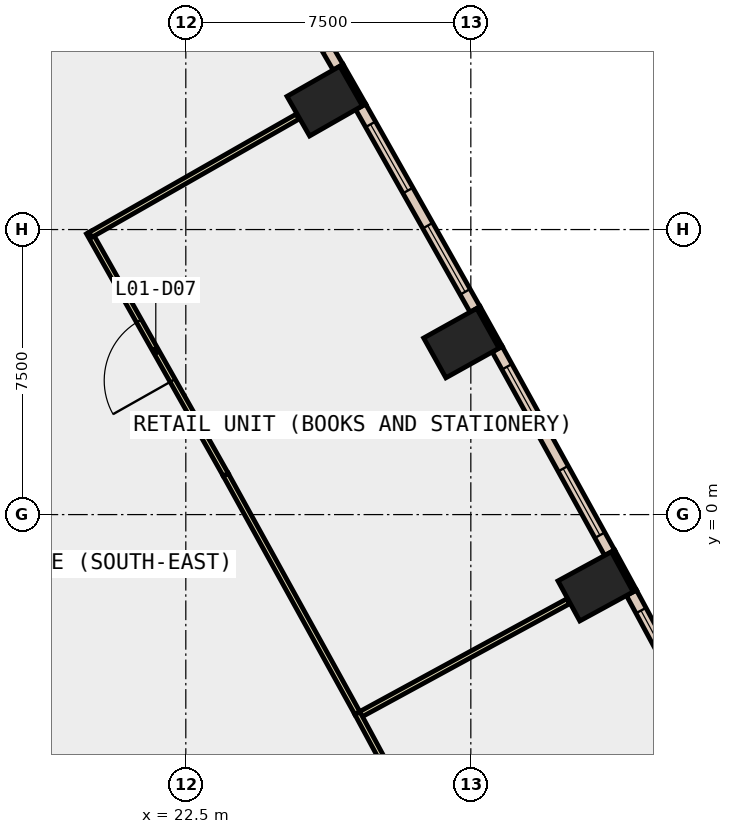
"""IFC4 building model, lengths in metres.
Left out: names, types, materials, properties, quantities, classifications, styles, units other than length and angle.
Written with IfcOpenShell. Run it as: python <this file> out.ifc"""

import sys

from ifc_helpers import new_model, si_unit, direction, frame, frame_2d, origin, origin_2d, place, context, subcontext, project, spatial, rectangle, extrude, element, fill, save


model = new_model("IFC4")
c1 = context("Model", 3, precision=1e-05, world=origin(), true_north=direction((0.0, 1.0)))
c2 = subcontext(c1, "Body", "Model", "MODEL_VIEW")
j1 = project(units=[si_unit("LENGTHUNIT", "METRE"), si_unit("PLANEANGLEUNIT", "RADIAN")], contexts=[c1])
p1 = place(None, origin())
s1 = spatial("IfcSite", under=j1, at=p1, CompositionType="ELEMENT")
p2 = place(p1, origin())
s2 = spatial("IfcBuilding", under=s1, at=p2, CompositionType="ELEMENT")
p3 = place(p2, frame((0.0, 0.0, 9.0)))
s3 = spatial("IfcBuildingStorey", under=s2, at=p3, CompositionType="ELEMENT", Elevation=9.0)
for number, where, z_axis, x_axis in (
    (1, (33.283, -1.889, -0.45), (0.0, 0.0, 1.0), (-0.478, 0.878, 0.0)),
    (2, (29.75, 4.512, -0.45), (0.0, 0.0, 1.0), (-0.487, 0.873, 0.0)),
    (3, (26.155, 10.88, -0.45), (0.0, 0.0, 1.0), (-0.496, 0.869, 0.0)),
):
    element("IfcColumn", number, at=place(p3, frame(where, z_axis=z_axis, x_axis=x_axis)), inside=s3, PredefinedType="COLUMN", context=c2, shape_type="SweptSolid", body=[
        extrude(rectangle(XDim=1.2, YDim=1.6, at=origin_2d()), origin(), (0.0, 0.0, 1.0), 6.0),
    ])
p4 = place(p3, frame((34.316, -2.01, 0.0), z_axis=(0.0, 0.0, 1.0), x_axis=(-0.478267644701, 0.878214131082, 0.0)))
e4 = element("IfcWall", 4, at=p4, inside=s3, PredefinedType="STANDARD", context=c2, shape_type="SweptSolid", body=[
    extrude(rectangle(XDim=1.2, YDim=0.1, at=frame_2d((0.6, 0.0))), origin(), (0.0, 0.0, 1.0), 5.55),
])
p5 = place(p3, frame((30.784, 4.402, 0.0), z_axis=(0.0, 0.0, 1.0), x_axis=(-0.486817526853, 0.873503689488, 0.0)))
e5 = element("IfcWall", 5, at=p5, inside=s3, PredefinedType="STANDARD", context=c2, shape_type="SweptSolid", body=[
    extrude(rectangle(XDim=1.2, YDim=0.1, at=frame_2d((0.6, 0.0))), origin(), (0.0, 0.0, 1.0), 5.55),
])
p6 = place(p3, frame((27.191, 10.78, 0.0), z_axis=(0.0, 0.0, 1.0), x_axis=(-0.495854054996, 0.868405870629, 0.0)))
e6 = element("IfcWall", 6, at=p6, inside=s3, PredefinedType="STANDARD", context=c2, shape_type="SweptSolid", body=[
    extrude(rectangle(XDim=1.2, YDim=0.1, at=frame_2d((0.6, 0.0))), origin(), (0.0, 0.0, 1.0), 5.55),
])
p7 = place(p3, frame((37.131, -7.446, 0.0), z_axis=(0.0, 0.0, 1.0), x_axis=(-0.474584950749, 0.880209704856, 0.0)))
e7 = element("IfcWall", 7, at=p7, inside=s3, PredefinedType="STANDARD", context=c2, shape_type="SweptSolid", body=[
    extrude(rectangle(XDim=6.121, YDim=0.3, at=frame_2d((3.061, 0.0))), origin(), (0.0, 0.0, 1.0), 5.55),
])
p8 = place(p7, frame((0.53, 0.0, 1.0)))
e8 = element("IfcOpeningElement", 8, at=p8, cuts=e7, PredefinedType="OPENING", context=c2, shape_type="SweptSolid", body=[
    extrude(rectangle(XDim=2.0, YDim=4.0, at=frame_2d((1.0, 2.0))), frame((0.0, 0.16, 0.0), z_axis=(0.0, -1.0, 0.0), x_axis=(1.0, 0.0, 0.0)), (0.0, 0.0, 1.0), 0.32),
])
p9 = place(p7, frame((3.591, 0.0, 1.0)))
e9 = element("IfcOpeningElement", 9, at=p9, cuts=e7, PredefinedType="OPENING", context=c2, shape_type="SweptSolid", body=[
    extrude(rectangle(XDim=2.0, YDim=4.0, at=frame_2d((1.0, 2.0))), frame((0.0, 0.16, 0.0), z_axis=(0.0, -1.0, 0.0), x_axis=(1.0, 0.0, 0.0)), (0.0, 0.0, 1.0), 0.32),
])
p10 = place(p3, frame((33.652, -1.006, 0.0), z_axis=(0.0, 0.0, 1.0), x_axis=(-0.483233380559, 0.875491576152, 0.0)))
e10 = element("IfcWall", 10, at=p10, inside=s3, PredefinedType="STANDARD", context=c2, shape_type="SweptSolid", body=[
    extrude(rectangle(XDim=6.121, YDim=0.3, at=frame_2d((3.061, 0.0))), origin(), (0.0, 0.0, 1.0), 5.55),
])
p11 = place(p10, frame((0.53, 0.0, 1.0)))
e11 = element("IfcOpeningElement", 11, at=p11, cuts=e10, PredefinedType="OPENING", context=c2, shape_type="SweptSolid", body=[
    extrude(rectangle(XDim=2.0, YDim=4.0, at=frame_2d((1.0, 2.0))), frame((0.0, 0.16, 0.0), z_axis=(0.0, -1.0, 0.0), x_axis=(1.0, 0.0, 0.0)), (0.0, 0.0, 1.0), 0.32),
])
p12 = place(p10, frame((3.591, 0.0, 1.0)))
e12 = element("IfcOpeningElement", 12, at=p12, cuts=e10, PredefinedType="OPENING", context=c2, shape_type="SweptSolid", body=[
    extrude(rectangle(XDim=2.0, YDim=4.0, at=frame_2d((1.0, 2.0))), frame((0.0, 0.16, 0.0), z_axis=(0.0, -1.0, 0.0), x_axis=(1.0, 0.0, 0.0)), (0.0, 0.0, 1.0), 0.32),
])
p13 = place(p3, frame((30.111, 5.399, 0.0), z_axis=(0.0, 0.0, 1.0), x_axis=(-0.491661677717, 0.870786308267, 0.0)))
e13 = element("IfcWall", 13, at=p13, inside=s3, PredefinedType="STANDARD", context=c2, shape_type="SweptSolid", body=[
    extrude(rectangle(XDim=6.122, YDim=0.3, at=frame_2d((3.061, 0.0))), origin(), (0.0, 0.0, 1.0), 5.55),
])
p14 = place(p13, frame((0.531, 0.0, 1.0)))
e14 = element("IfcOpeningElement", 14, at=p14, cuts=e13, PredefinedType="OPENING", context=c2, shape_type="SweptSolid", body=[
    extrude(rectangle(XDim=2.0, YDim=4.0, at=frame_2d((1.0, 2.0))), frame((0.0, 0.16, 0.0), z_axis=(0.0, -1.0, 0.0), x_axis=(1.0, 0.0, 0.0)), (0.0, 0.0, 1.0), 0.32),
])
p15 = place(p13, frame((3.592, 0.0, 1.0)))
e15 = element("IfcOpeningElement", 15, at=p15, cuts=e13, PredefinedType="OPENING", context=c2, shape_type="SweptSolid", body=[
    extrude(rectangle(XDim=2.0, YDim=4.0, at=frame_2d((1.0, 2.0))), frame((0.0, 0.16, 0.0), z_axis=(0.0, -1.0, 0.0), x_axis=(1.0, 0.0, 0.0)), (0.0, 0.0, 1.0), 0.32),
])
p16 = place(p3, frame((26.507, 11.77, 0.0), z_axis=(0.0, 0.0, 1.0), x_axis=(-0.499939977436, 0.866060055055, 0.0)))
e16 = element("IfcWall", 16, at=p16, inside=s3, PredefinedType="STANDARD", context=c2, shape_type="SweptSolid", body=[
    extrude(rectangle(XDim=6.121, YDim=0.3, at=frame_2d((3.061, 0.0))), origin(), (0.0, 0.0, 1.0), 5.55),
])
p17 = place(p16, frame((0.53, 0.0, 1.0)))
e17 = element("IfcOpeningElement", 17, at=p17, cuts=e16, PredefinedType="OPENING", context=c2, shape_type="SweptSolid", body=[
    extrude(rectangle(XDim=2.0, YDim=4.0, at=frame_2d((1.0, 2.0))), frame((0.0, 0.16, 0.0), z_axis=(0.0, -1.0, 0.0), x_axis=(1.0, 0.0, 0.0)), (0.0, 0.0, 1.0), 0.32),
])
p18 = place(p16, frame((3.591, 0.0, 1.0)))
e18 = element("IfcOpeningElement", 18, at=p18, cuts=e16, PredefinedType="OPENING", context=c2, shape_type="SweptSolid", body=[
    extrude(rectangle(XDim=2.0, YDim=4.0, at=frame_2d((1.0, 2.0))), frame((0.0, 0.16, 0.0), z_axis=(0.0, -1.0, 0.0), x_axis=(1.0, 0.0, 0.0)), (0.0, 0.0, 1.0), 0.32),
])
p19 = place(p3, frame((27.047, -5.284, 0.0), z_axis=(0.0, 0.0, 1.0), x_axis=(0.878278583626, 0.478149275377, 0.0)))
e19 = element("IfcWall", 19, at=p19, inside=s3, PredefinedType="PARTITIONING", context=c2, shape_type="SweptSolid", body=[
    extrude(rectangle(XDim=6.28, YDim=0.15, at=frame_2d((3.14, 0.0))), origin(), (0.0, 0.0, 1.0), 5.55),
])
p20 = place(p3, frame((30.488, -11.666, 0.0), z_axis=(0.0, 0.0, 1.0), x_axis=(-0.474672609217, 0.880162436178, 0.0)))
e20 = element("IfcWall", 20, at=p20, inside=s3, PredefinedType="PARTITIONING", context=c2, shape_type="SweptSolid", body=[
    extrude(rectangle(XDim=7.319, YDim=0.15, at=frame_2d((3.66, 0.0))), origin(), (0.0, 0.0, 1.0), 5.55),
])
p21 = place(p20, frame((0.1, 0.0, 0.0)))
e21 = element("IfcOpeningElement", 21, at=p21, cuts=e20, PredefinedType="OPENING", context=c2, shape_type="SweptSolid", body=[
    extrude(rectangle(XDim=1.8, YDim=2.1, at=frame_2d((0.9, 1.05))), frame((0.0, 0.085, 0.0), z_axis=(0.0, -1.0, 0.0), x_axis=(1.0, 0.0, 0.0)), (0.0, 0.0, 1.0), 0.17),
])
p22 = place(p3, frame((27.014, -5.224, 0.0), z_axis=(0.0, 0.0, 1.0), x_axis=(-0.483261020847, 0.875476319343, 0.0)))
e22 = element("IfcWall", 22, at=p22, inside=s3, PredefinedType="PARTITIONING", context=c2, shape_type="SweptSolid", body=[
    extrude(rectangle(XDim=7.168, YDim=0.15, at=frame_2d((3.584, 0.0))), origin(), (0.0, 0.0, 1.0), 5.55),
])
p23 = place(p3, frame((23.55, 1.051, 0.0), z_axis=(0.0, 0.0, 1.0), x_axis=(-0.491584576708, 0.870829836388, 0.0)))
e23 = element("IfcWall", 23, at=p23, inside=s3, PredefinedType="PARTITIONING", context=c2, shape_type="SweptSolid", body=[
    extrude(rectangle(XDim=7.32, YDim=0.15, at=frame_2d((3.66, 0.0))), origin(), (0.0, 0.0, 1.0), 5.55),
])
p24 = place(p23, frame((2.843, 0.0, 0.0)))
e24 = element("IfcOpeningElement", 24, at=p24, cuts=e23, PredefinedType="OPENING", context=c2, shape_type="SweptSolid", body=[
    extrude(rectangle(XDim=1.8, YDim=2.1, at=frame_2d((0.9, 1.05))), frame((0.0, 0.085, 0.0), z_axis=(0.0, -1.0, 0.0), x_axis=(1.0, 0.0, 0.0)), (0.0, 0.0, 1.0), 0.17),
])
p25 = place(p3, frame((19.989, 7.361, 0.0), z_axis=(0.0, 0.0, 1.0), x_axis=(0.868573128473, 0.495561015914, 0.0)))
e25 = element("IfcWall", 25, at=p25, inside=s3, PredefinedType="PARTITIONING", context=c2, shape_type="SweptSolid", body=[
    extrude(rectangle(XDim=6.279, YDim=0.15, at=frame_2d((3.14, 0.0))), origin(), (0.0, 0.0, 1.0), 5.55),
])
p26 = place(p3, frame((10.392, -3.5, 0.0), z_axis=(0.0, 0.0, 1.0), x_axis=(0.866033409894, -0.499986132754, 0.0)))
e26 = element("IfcWall", 26, at=p26, inside=s3, PredefinedType="PARTITIONING", context=c2, shape_type="SweptSolid", body=[
    extrude(rectangle(XDim=21.8, YDim=0.15, at=frame_2d((10.9, 0.0))), origin(), (0.0, 0.0, 1.0), 5.55),
])
p27 = place(p26, frame((10.08, 0.0, 0.0)))
e27 = element("IfcOpeningElement", 27, at=p27, cuts=e26, PredefinedType="OPENING", context=c2, shape_type="SweptSolid", body=[
    extrude(rectangle(XDim=1.8, YDim=2.1, at=frame_2d((0.9, 1.05))), frame((0.0, 0.085, 0.0), z_axis=(0.0, -1.0, 0.0), x_axis=(1.0, 0.0, 0.0)), (0.0, 0.0, 1.0), 0.17),
])
p28 = place(p9, origin())
e28 = element("IfcWindow", 28, at=p28, inside=s3, PartitioningType="SINGLE_PANEL", PredefinedType="WINDOW", context=c2, shape_type="SweptSolid", body=[
    extrude(rectangle(XDim=2.0, YDim=4.0, at=frame_2d((1.0, 2.0))), frame((0.0, 0.03, 0.0), z_axis=(0.0, -1.0, 0.0), x_axis=(1.0, 0.0, 0.0)), (0.0, 0.0, 1.0), 0.06),
])
fill(e9, e28)
p29 = place(p11, origin())
e29 = element("IfcWindow", 29, at=p29, inside=s3, PartitioningType="SINGLE_PANEL", PredefinedType="WINDOW", context=c2, shape_type="SweptSolid", body=[
    extrude(rectangle(XDim=2.0, YDim=4.0, at=frame_2d((1.0, 2.0))), frame((0.0, 0.03, 0.0), z_axis=(0.0, -1.0, 0.0), x_axis=(1.0, 0.0, 0.0)), (0.0, 0.0, 1.0), 0.06),
])
fill(e11, e29)
p30 = place(p12, origin())
e30 = element("IfcWindow", 30, at=p30, inside=s3, PartitioningType="SINGLE_PANEL", PredefinedType="WINDOW", context=c2, shape_type="SweptSolid", body=[
    extrude(rectangle(XDim=2.0, YDim=4.0, at=frame_2d((1.0, 2.0))), frame((0.0, 0.03, 0.0), z_axis=(0.0, -1.0, 0.0), x_axis=(1.0, 0.0, 0.0)), (0.0, 0.0, 1.0), 0.06),
])
fill(e12, e30)
p31 = place(p14, origin())
e31 = element("IfcWindow", 31, at=p31, inside=s3, PartitioningType="SINGLE_PANEL", PredefinedType="WINDOW", context=c2, shape_type="SweptSolid", body=[
    extrude(rectangle(XDim=2.0, YDim=4.0, at=frame_2d((1.0, 2.0))), frame((0.0, 0.03, 0.0), z_axis=(0.0, -1.0, 0.0), x_axis=(1.0, 0.0, 0.0)), (0.0, 0.0, 1.0), 0.06),
])
fill(e14, e31)
p32 = place(p15, origin())
e32 = element("IfcWindow", 32, at=p32, inside=s3, PartitioningType="SINGLE_PANEL", PredefinedType="WINDOW", context=c2, shape_type="SweptSolid", body=[
    extrude(rectangle(XDim=2.0, YDim=4.0, at=frame_2d((1.0, 2.0))), frame((0.0, 0.03, 0.0), z_axis=(0.0, -1.0, 0.0), x_axis=(1.0, 0.0, 0.0)), (0.0, 0.0, 1.0), 0.06),
])
fill(e15, e32)
p33 = place(p24, origin())
e33 = element("IfcDoor", 33, at=p33, inside=s3, OperationType="DOUBLE_DOOR_SINGLE_SWING", PredefinedType="DOOR", context=c2, shape_type="SweptSolid", body=[
    extrude(rectangle(XDim=1.8, YDim=2.1, at=frame_2d((0.9, 1.05))), frame((0.0, 0.025, 0.0), z_axis=(0.0, -1.0, 0.0), x_axis=(1.0, 0.0, 0.0)), (0.0, 0.0, 1.0), 0.05),
])
fill(e24, e33)
save(model, sys.argv[1])
